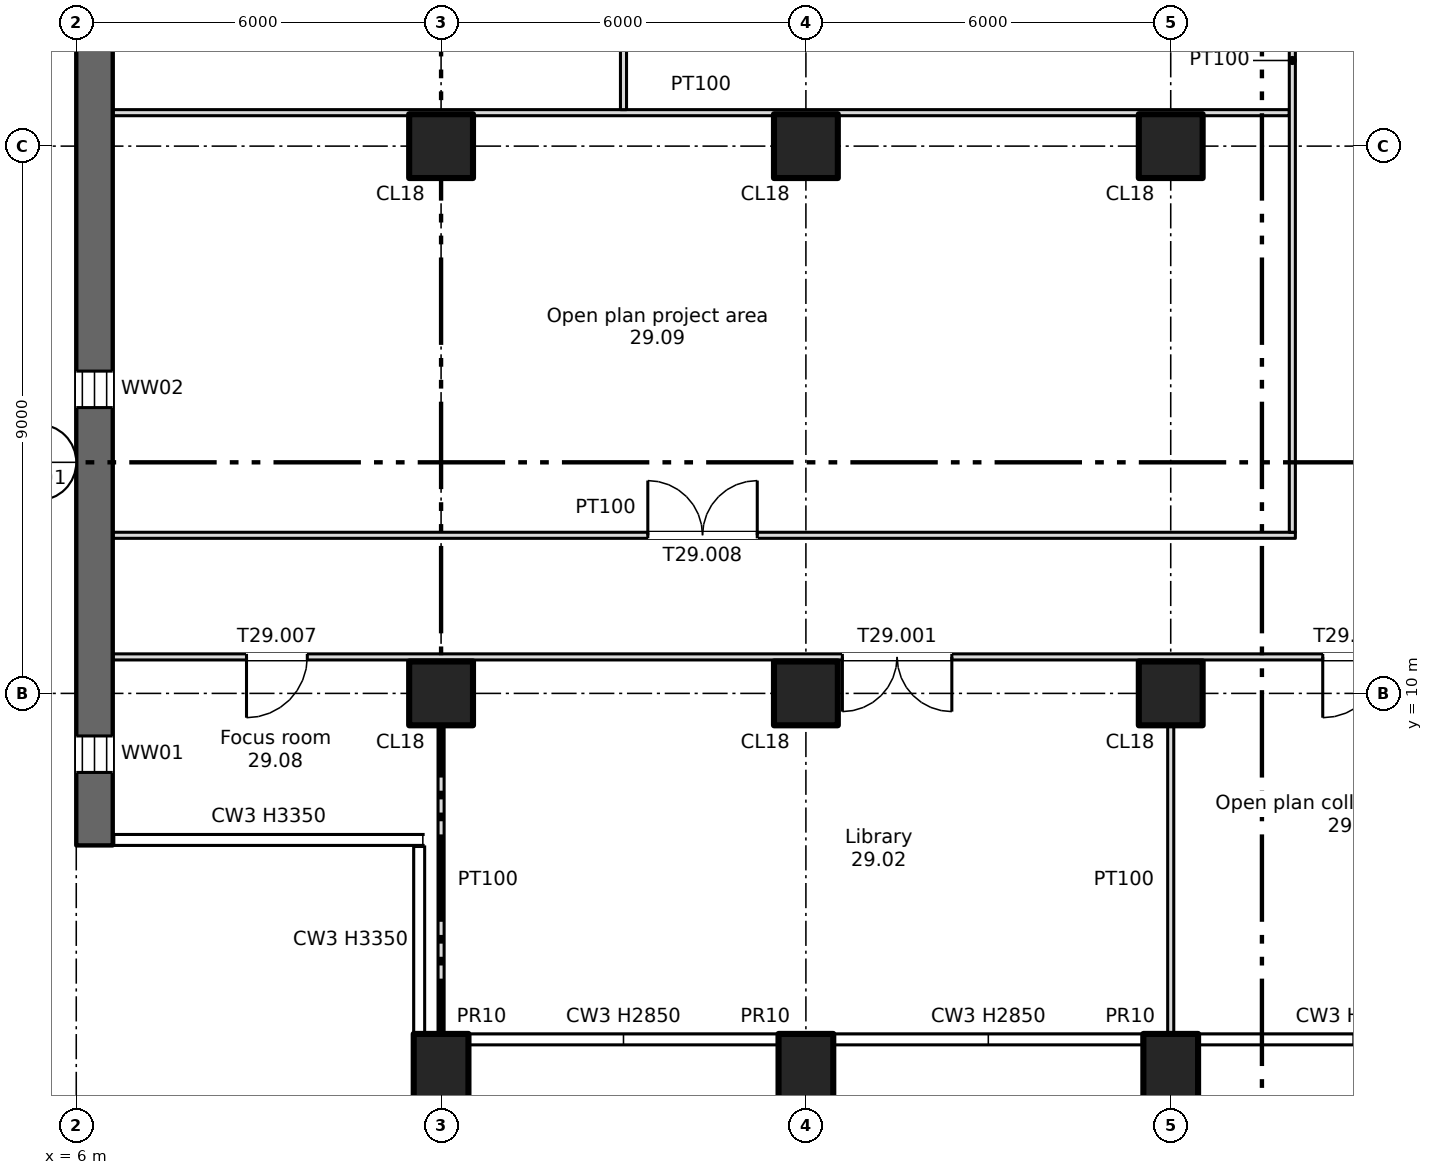
"""IFC4 building model, lengths in metres.
Left out: names, types, materials, properties, quantities, classifications, styles, units other than length and angle.
Written with IfcOpenShell. Run it as: python <this file> out.ifc"""

import sys

from ifc_helpers import new_model, si_unit, direction, frame, frame_2d, origin, origin_2d, place, context, subcontext, project, spatial, rectangle, extrude, element, fill, save


model = new_model("IFC4")
c1 = context("Model", 3, precision=1e-05, world=origin(), true_north=direction((0.0, 1.0)))
c2 = subcontext(c1, "Body", "Model", "MODEL_VIEW")
j1 = project(units=[si_unit("LENGTHUNIT", "METRE"), si_unit("PLANEANGLEUNIT", "RADIAN")], contexts=[c1])
p1 = place(None, origin())
s1 = spatial("IfcSite", under=j1, at=p1, CompositionType="ELEMENT")
p2 = place(p1, origin())
s2 = spatial("IfcBuilding", under=s1, at=p2, CompositionType="ELEMENT")
p3 = place(p2, frame((0.0, 0.0, 204.25)))
s3 = spatial("IfcBuildingStorey", under=s2, at=p3, CompositionType="ELEMENT", Elevation=204.25)
for number, where, z_axis, x_axis in (
    (1, (12.0, 3.7, -0.4), (0.0, 0.0, 1.0), (1.0, 0.0, 0.0)),
    (2, (18.0, 3.7, -0.4), (0.0, 0.0, 1.0), (1.0, 0.0, 0.0)),
    (3, (24.0, 3.7, -0.4), (0.0, 0.0, 1.0), (1.0, 0.0, 0.0)),
):
    element("IfcColumn", number, at=place(p3, frame(where, z_axis=z_axis, x_axis=x_axis)), inside=s3, PredefinedType="COLUMN", context=c2, shape_type="SweptSolid", body=[
        extrude(rectangle(XDim=0.9, YDim=1.4, at=origin_2d()), origin(), (0.0, 0.0, 1.0), 3.75),
    ])
for number, where, z_axis, x_axis in (
    (4, (12.0, 10.0, 0.0), (0.0, 0.0, 1.0), (1.0, 0.0, 0.0)),
    (5, (12.0, 19.0, 0.0), (0.0, 0.0, 1.0), (1.0, 0.0, 0.0)),
    (6, (18.0, 10.0, 0.0), (0.0, 0.0, 1.0), (1.0, 0.0, 0.0)),
    (7, (18.0, 19.0, 0.0), (0.0, 0.0, 1.0), (1.0, 0.0, 0.0)),
    (8, (24.0, 10.0, 0.0), (0.0, 0.0, 1.0), (1.0, 0.0, 0.0)),
    (9, (24.0, 19.0, 0.0), (0.0, 0.0, 1.0), (1.0, 0.0, 0.0)),
):
    element("IfcColumn", number, at=place(p3, frame(where, z_axis=z_axis, x_axis=x_axis)), inside=s3, PredefinedType="COLUMN", context=c2, shape_type="SweptSolid", body=[
        extrude(rectangle(XDim=1.05, YDim=1.05, at=origin_2d()), origin(), (0.0, 0.0, 1.0), 3.35),
    ])
p4 = place(p3, frame((6.3, 7.5, 0.0), z_axis=(0.0, 0.0, 1.0), x_axis=(0.0, 1.0, 0.0)))
e10 = element("IfcWall", 10, at=p4, inside=s3, PredefinedType="SHEAR", context=c2, shape_type="SweptSolid", body=[
    extrude(rectangle(XDim=34.0, YDim=0.6, at=frame_2d((17.0, 0.0))), origin(), (0.0, 0.0, 1.0), 3.35),
])
p5 = place(p4, frame((1.2, 0.0, 0.6)))
e11 = element("IfcOpeningElement", 11, at=p5, cuts=e10, PredefinedType="OPENING", context=c2, shape_type="SweptSolid", body=[
    extrude(rectangle(XDim=0.6, YDim=2.4, at=frame_2d((0.3, 1.2))), frame((0.0, 0.31, 0.0), z_axis=(0.0, -1.0, 0.0), x_axis=(1.0, 0.0, 0.0)), (0.0, 0.0, 1.0), 0.62),
])
p6 = place(p4, frame((7.2, 0.0, 0.6)))
e12 = element("IfcOpeningElement", 12, at=p6, cuts=e10, PredefinedType="OPENING", context=c2, shape_type="SweptSolid", body=[
    extrude(rectangle(XDim=0.6, YDim=2.4, at=frame_2d((0.3, 1.2))), frame((0.0, 0.31, 0.0), z_axis=(0.0, -1.0, 0.0), x_axis=(1.0, 0.0, 0.0)), (0.0, 0.0, 1.0), 0.62),
])
p7 = place(p4, frame((13.2, 0.0, 0.6)))
e13 = element("IfcOpeningElement", 13, at=p7, cuts=e10, PredefinedType="OPENING", context=c2, shape_type="SweptSolid", body=[
    extrude(rectangle(XDim=0.6, YDim=2.4, at=frame_2d((0.3, 1.2))), frame((0.0, 0.31, 0.0), z_axis=(0.0, -1.0, 0.0), x_axis=(1.0, 0.0, 0.0)), (0.0, 0.0, 1.0), 0.62),
])
p8 = place(p4, frame((19.2, 0.0, 0.6)))
e14 = element("IfcOpeningElement", 14, at=p8, cuts=e10, PredefinedType="OPENING", context=c2, shape_type="SweptSolid", body=[
    extrude(rectangle(XDim=0.6, YDim=2.4, at=frame_2d((0.3, 1.2))), frame((0.0, 0.31, 0.0), z_axis=(0.0, -1.0, 0.0), x_axis=(1.0, 0.0, 0.0)), (0.0, 0.0, 1.0), 0.62),
])
p9 = place(p3, frame((6.6, 10.6, 0.0), z_axis=(0.0, 0.0, 1.0), x_axis=(1.0, 0.0, 0.0)))
e15 = element("IfcWall", 15, at=p9, inside=s3, PredefinedType="PARTITIONING", context=c2, shape_type="SweptSolid", body=[
    extrude(rectangle(XDim=64.8, YDim=0.1, at=frame_2d((32.4, 0.0))), origin(), (0.0, 0.0, 1.0), 3.35),
])
p10 = place(p9, frame((12.0, 0.0, 0.0)))
e16 = element("IfcOpeningElement", 16, at=p10, cuts=e15, PredefinedType="OPENING", context=c2, shape_type="SweptSolid", body=[
    extrude(rectangle(XDim=1.8, YDim=2.1, at=frame_2d((0.9, 1.05))), frame((0.0, 0.06, 0.0), z_axis=(0.0, -1.0, 0.0), x_axis=(1.0, 0.0, 0.0)), (0.0, 0.0, 1.0), 0.12),
])
p11 = place(p9, frame((19.9, 0.0, 0.0)))
e17 = element("IfcOpeningElement", 17, at=p11, cuts=e15, PredefinedType="OPENING", context=c2, shape_type="SweptSolid", body=[
    extrude(rectangle(XDim=1.0, YDim=2.1, at=frame_2d((0.5, 1.05))), frame((0.0, 0.06, 0.0), z_axis=(0.0, -1.0, 0.0), x_axis=(1.0, 0.0, 0.0)), (0.0, 0.0, 1.0), 0.12),
])
p12 = place(p9, frame((30.0, 0.0, 0.0)))
e18 = element("IfcOpeningElement", 18, at=p12, cuts=e15, PredefinedType="OPENING", context=c2, shape_type="SweptSolid", body=[
    extrude(rectangle(XDim=1.8, YDim=2.1, at=frame_2d((0.9, 1.05))), frame((0.0, 0.06, 0.0), z_axis=(0.0, -1.0, 0.0), x_axis=(1.0, 0.0, 0.0)), (0.0, 0.0, 1.0), 0.12),
])
p13 = place(p9, frame((42.0, 0.0, 0.0)))
e19 = element("IfcOpeningElement", 19, at=p13, cuts=e15, PredefinedType="OPENING", context=c2, shape_type="SweptSolid", body=[
    extrude(rectangle(XDim=1.8, YDim=2.1, at=frame_2d((0.9, 1.05))), frame((0.0, 0.06, 0.0), z_axis=(0.0, -1.0, 0.0), x_axis=(1.0, 0.0, 0.0)), (0.0, 0.0, 1.0), 0.12),
])
p14 = place(p9, frame((51.4, 0.0, 0.0)))
e20 = element("IfcOpeningElement", 20, at=p14, cuts=e15, PredefinedType="OPENING", context=c2, shape_type="SweptSolid", body=[
    extrude(rectangle(XDim=1.0, YDim=2.1, at=frame_2d((0.5, 1.05))), frame((0.0, 0.06, 0.0), z_axis=(0.0, -1.0, 0.0), x_axis=(1.0, 0.0, 0.0)), (0.0, 0.0, 1.0), 0.12),
])
p15 = place(p9, frame((60.1, 0.0, 0.0)))
e21 = element("IfcOpeningElement", 21, at=p15, cuts=e15, PredefinedType="OPENING", context=c2, shape_type="SweptSolid", body=[
    extrude(rectangle(XDim=1.0, YDim=2.1, at=frame_2d((0.5, 1.05))), frame((0.0, 0.06, 0.0), z_axis=(0.0, -1.0, 0.0), x_axis=(1.0, 0.0, 0.0)), (0.0, 0.0, 1.0), 0.12),
])
p16 = place(p9, frame((2.2, 0.0, 0.0)))
e22 = element("IfcOpeningElement", 22, at=p16, cuts=e15, PredefinedType="OPENING", context=c2, shape_type="SweptSolid", body=[
    extrude(rectangle(XDim=1.0, YDim=2.1, at=frame_2d((0.5, 1.05))), frame((0.0, 0.06, 0.0), z_axis=(0.0, -1.0, 0.0), x_axis=(1.0, 0.0, 0.0)), (0.0, 0.0, 1.0), 0.12),
])
p17 = place(p3, frame((6.6, 12.6, 0.0), z_axis=(0.0, 0.0, 1.0), x_axis=(1.0, 0.0, 0.0)))
e23 = element("IfcWall", 23, at=p17, inside=s3, PredefinedType="PARTITIONING", context=c2, shape_type="SweptSolid", body=[
    extrude(rectangle(XDim=19.45, YDim=0.1, at=frame_2d((9.725, 0.0))), origin(), (0.0, 0.0, 1.0), 3.35),
])
p18 = place(p17, frame((8.8, 0.0, 0.0)))
e24 = element("IfcOpeningElement", 24, at=p18, cuts=e23, PredefinedType="OPENING", context=c2, shape_type="SweptSolid", body=[
    extrude(rectangle(XDim=1.8, YDim=2.1, at=frame_2d((0.9, 1.05))), frame((0.0, 0.06, 0.0), z_axis=(0.0, -1.0, 0.0), x_axis=(1.0, 0.0, 0.0)), (0.0, 0.0, 1.0), 0.12),
])
p19 = place(p3, frame((6.6, 19.55, 0.0), z_axis=(0.0, 0.0, 1.0), x_axis=(1.0, 0.0, 0.0)))
e25 = element("IfcWall", 25, at=p19, inside=s3, PredefinedType="PARTITIONING", context=c2, shape_type="SweptSolid", body=[
    extrude(rectangle(XDim=19.35, YDim=0.1, at=frame_2d((9.675, 0.0))), origin(), (0.0, 0.0, 1.0), 3.35),
])
p20 = place(p3, frame((12.0, 4.4, 0.0), z_axis=(0.0, 0.0, 1.0), x_axis=(0.0, 1.0, 0.0)))
e26 = element("IfcWall", 26, at=p20, inside=s3, PredefinedType="PARTITIONING", context=c2, shape_type="SweptSolid", body=[
    extrude(rectangle(XDim=5.075, YDim=0.1, at=frame_2d((2.538, 0.0))), origin(), (0.0, 0.0, 1.0), 3.35),
])
p21 = place(p3, frame((15.0, 19.6, 0.0), z_axis=(0.0, 0.0, 1.0), x_axis=(0.0, 1.0, 0.0)))
e27 = element("IfcWall", 27, at=p21, inside=s3, PredefinedType="PARTITIONING", context=c2, shape_type="SweptSolid", body=[
    extrude(rectangle(XDim=6.35, YDim=0.1, at=frame_2d((3.175, 0.0))), origin(), (0.0, 0.0, 1.0), 3.35),
])
p22 = place(p3, frame((24.0, 4.4, 0.0), z_axis=(0.0, 0.0, 1.0), x_axis=(0.0, 1.0, 0.0)))
e28 = element("IfcWall", 28, at=p22, inside=s3, PredefinedType="PARTITIONING", context=c2, shape_type="SweptSolid", body=[
    extrude(rectangle(XDim=5.075, YDim=0.1, at=frame_2d((2.538, 0.0))), origin(), (0.0, 0.0, 1.0), 3.35),
])
p23 = place(p3, frame((26.0, 12.65, 0.0), z_axis=(0.0, 0.0, 1.0), x_axis=(0.0, 1.0, 0.0)))
e29 = element("IfcWall", 29, at=p23, inside=s3, PredefinedType="PARTITIONING", context=c2, shape_type="SweptSolid", body=[
    extrude(rectangle(XDim=13.3, YDim=0.1, at=frame_2d((6.65, 0.0))), origin(), (0.0, 0.0, 1.0), 3.35),
])
p24 = place(p5, origin())
e30 = element("IfcWindow", 30, at=p24, inside=s3, PartitioningType="SINGLE_PANEL", PredefinedType="WINDOW", context=c2, shape_type="SweptSolid", body=[
    extrude(rectangle(XDim=0.6, YDim=2.4, at=frame_2d((0.3, 1.2))), frame((0.0, 0.03, 0.0), z_axis=(0.0, -1.0, 0.0), x_axis=(1.0, 0.0, 0.0)), (0.0, 0.0, 1.0), 0.06),
])
fill(e11, e30)
p25 = place(p6, origin())
e31 = element("IfcWindow", 31, at=p25, inside=s3, PartitioningType="SINGLE_PANEL", PredefinedType="WINDOW", context=c2, shape_type="SweptSolid", body=[
    extrude(rectangle(XDim=0.6, YDim=2.4, at=frame_2d((0.3, 1.2))), frame((0.0, 0.03, 0.0), z_axis=(0.0, -1.0, 0.0), x_axis=(1.0, 0.0, 0.0)), (0.0, 0.0, 1.0), 0.06),
])
fill(e12, e31)
p26 = place(p10, origin())
e32 = element("IfcDoor", 32, at=p26, inside=s3, OperationType="DOUBLE_DOOR_SINGLE_SWING", PredefinedType="DOOR", context=c2, shape_type="SweptSolid", body=[
    extrude(rectangle(XDim=1.8, YDim=2.1, at=frame_2d((0.9, 1.05))), frame((0.0, 0.025, 0.0), z_axis=(0.0, -1.0, 0.0), x_axis=(1.0, 0.0, 0.0)), (0.0, 0.0, 1.0), 0.05),
])
fill(e16, e32)
p27 = place(p11, origin())
e33 = element("IfcDoor", 33, at=p27, inside=s3, OperationType="SINGLE_SWING_LEFT", PredefinedType="DOOR", context=c2, shape_type="SweptSolid", body=[
    extrude(rectangle(XDim=1.0, YDim=2.1, at=frame_2d((0.5, 1.05))), frame((0.0, 0.025, 0.0), z_axis=(0.0, -1.0, 0.0), x_axis=(1.0, 0.0, 0.0)), (0.0, 0.0, 1.0), 0.05),
])
fill(e17, e33)
p28 = place(p16, origin())
e34 = element("IfcDoor", 34, at=p28, inside=s3, OperationType="SINGLE_SWING_LEFT", PredefinedType="DOOR", context=c2, shape_type="SweptSolid", body=[
    extrude(rectangle(XDim=1.0, YDim=2.1, at=frame_2d((0.5, 1.05))), frame((0.0, 0.025, 0.0), z_axis=(0.0, -1.0, 0.0), x_axis=(1.0, 0.0, 0.0)), (0.0, 0.0, 1.0), 0.05),
])
fill(e22, e34)
p29 = place(p18, origin())
e35 = element("IfcDoor", 35, at=p29, inside=s3, OperationType="DOUBLE_DOOR_SINGLE_SWING", PredefinedType="DOOR", context=c2, shape_type="SweptSolid", body=[
    extrude(rectangle(XDim=1.8, YDim=2.1, at=frame_2d((0.9, 1.05))), frame((0.0, 0.025, 0.0), z_axis=(0.0, -1.0, 0.0), x_axis=(1.0, 0.0, 0.0)), (0.0, 0.0, 1.0), 0.05),
])
fill(e24, e35)
save(model, sys.argv[1])
